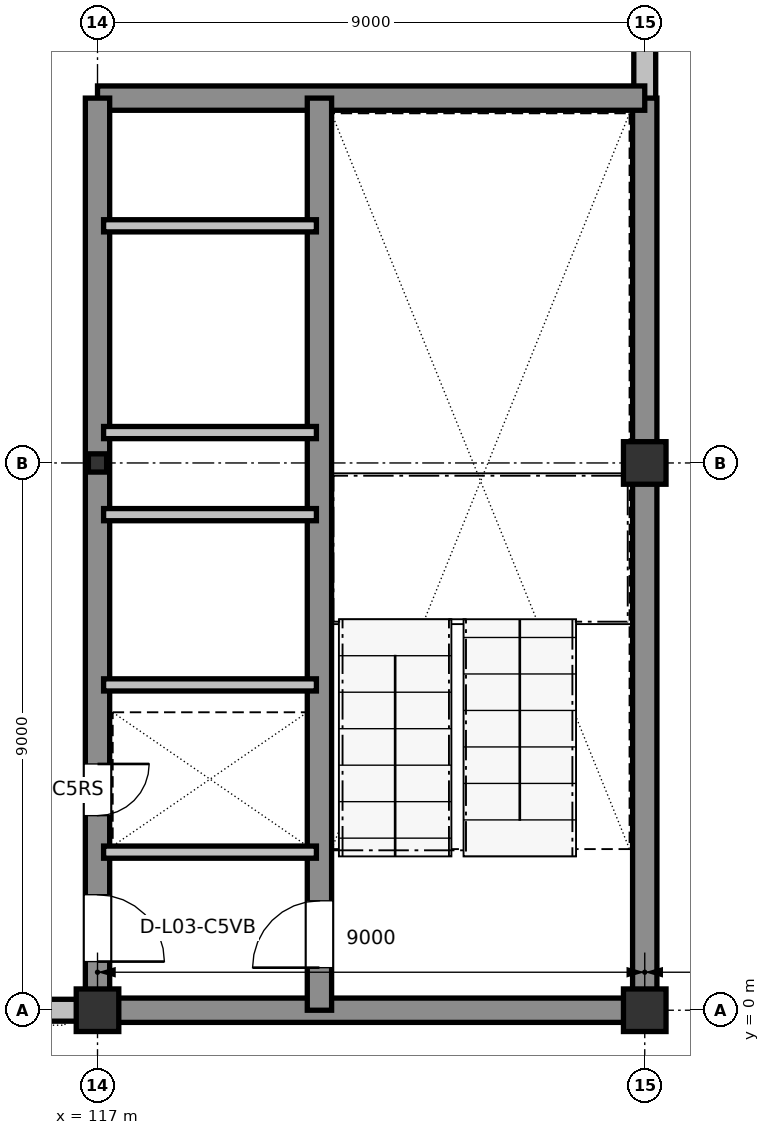
"""IFC4 building model, lengths in metres.
Left out: names, types, materials, properties, quantities, classifications, styles, units other than length and angle.
Written with IfcOpenShell. Run it as: python <this file> out.ifc"""

import sys

from ifc_helpers import new_model, si_unit, direction, frame, frame_2d, origin, origin_2d, place, context, subcontext, project, spatial, rectangle, i_section, extrude, element, fill, save


model = new_model("IFC4")
c1 = context("Model", 3, precision=1e-05, world=origin(), true_north=direction((0.0, 1.0)))
c2 = subcontext(c1, "Body", "Model", "MODEL_VIEW")
j1 = project(units=[si_unit("LENGTHUNIT", "METRE"), si_unit("PLANEANGLEUNIT", "RADIAN")], contexts=[c1])
p1 = place(None, origin())
s1 = spatial("IfcSite", under=j1, at=p1, CompositionType="ELEMENT")
p2 = place(p1, origin())
s2 = spatial("IfcBuilding", under=s1, at=p2, CompositionType="ELEMENT")
p3 = place(p2, frame((0.0, 0.0, 15.0)))
s3 = spatial("IfcBuildingStorey", under=s2, at=p3, CompositionType="ELEMENT", Elevation=15.0)
p4 = place(p3, frame((117.0, 0.0, 0.0), z_axis=(0.0, 0.0, 1.0), x_axis=(1.0, 0.0, 0.0)))
e1 = element("IfcColumn", 1, at=p4, inside=s3, PredefinedType="COLUMN", context=c2, shape_type="SweptSolid", body=[
    extrude(rectangle(XDim=0.7, YDim=0.7, at=origin_2d()), origin(), (0.0, 0.0, 1.0), 4.2),
])
p5 = place(p3, frame((117.0, 9.0, 0.0), z_axis=(0.0, 0.0, 1.0), x_axis=(1.0, 0.0, 0.0)))
e2 = element("IfcColumn", 2, at=p5, inside=s3, PredefinedType="COLUMN", context=c2, shape_type="SweptSolid", body=[
    extrude(i_section(OverallWidth=0.3, OverallDepth=0.3, WebThickness=0.011, FlangeThickness=0.019, at=origin_2d()), origin(), (0.0, 0.0, 1.0), 4.2),
])
for number, where, z_axis, x_axis in (
    (3, (126.0, 0.0, 0.0), (0.0, 0.0, 1.0), (1.0, 0.0, 0.0)),
    (4, (126.0, 9.0, 0.0), (0.0, 0.0, 1.0), (1.0, 0.0, 0.0)),
):
    element("IfcColumn", number, at=place(p3, frame(where, z_axis=z_axis, x_axis=x_axis)), inside=s3, PredefinedType="COLUMN", context=c2, shape_type="SweptSolid", body=[
        extrude(rectangle(XDim=0.7, YDim=0.7, at=origin_2d()), origin(), (0.0, 0.0, 1.0), 4.2),
    ])
p6 = place(p3, frame((108.335, 0.0, 0.0), z_axis=(0.0, 0.0, 1.0), x_axis=(1.0, 0.0, 0.0)))
e5 = element("IfcWall", 5, at=p6, inside=s3, PredefinedType="STANDARD", context=c2, shape_type="SweptSolid", body=[
    extrude(rectangle(XDim=8.33, YDim=0.36, at=frame_2d((4.165, 0.0))), origin(), (0.0, 0.0, 1.0), 3.635),
])
p7 = place(p6, frame((3.565, 0.0, 0.9)))
e6 = element("IfcOpeningElement", 6, at=p7, cuts=e5, PredefinedType="OPENING", context=c2, shape_type="SweptSolid", body=[
    extrude(rectangle(XDim=1.2, YDim=1.4, at=frame_2d((0.6, 0.7))), frame((0.0, 0.19, 0.0), z_axis=(0.0, -1.0, 0.0), x_axis=(1.0, 0.0, 0.0)), (0.0, 0.0, 1.0), 0.38),
])
p8 = place(p3, frame((126.0, 14.925, 0.0), z_axis=(0.0, 0.0, 1.0), x_axis=(0.0, 1.0, 0.0)))
e7 = element("IfcWall", 7, at=p8, inside=s3, PredefinedType="STANDARD", context=c2, shape_type="SweptSolid", body=[
    extrude(rectangle(XDim=2.74, YDim=0.36, at=frame_2d((1.37, 0.0))), origin(), (0.0, 0.0, 1.0), 3.635),
])
p9 = place(p3, frame((117.0, 0.0, 0.0), z_axis=(0.0, 0.0, 1.0), x_axis=(1.0, 0.0, 0.0)))
e8 = element("IfcWall", 8, at=p9, inside=s3, PredefinedType="SHEAR", context=c2, shape_type="SweptSolid", body=[
    extrude(rectangle(XDim=9.0, YDim=0.4, at=frame_2d((4.5, 0.0))), origin(), (0.0, 0.0, 1.0), 3.96),
])
p10 = place(p3, frame((126.0, 0.0, 0.0), z_axis=(0.0, 0.0, 1.0), x_axis=(0.0, 1.0, 0.0)))
e9 = element("IfcWall", 9, at=p10, inside=s3, PredefinedType="SHEAR", context=c2, shape_type="SweptSolid", body=[
    extrude(rectangle(XDim=15.0, YDim=0.4, at=frame_2d((7.5, 0.0))), origin(), (0.0, 0.0, 1.0), 3.96),
])
p11 = place(p3, frame((126.0, 15.0, 0.0), z_axis=(0.0, 0.0, 1.0), x_axis=(-1.0, 0.0, 0.0)))
e10 = element("IfcWall", 10, at=p11, inside=s3, PredefinedType="SHEAR", context=c2, shape_type="SweptSolid", body=[
    extrude(rectangle(XDim=9.0, YDim=0.4, at=frame_2d((4.5, 0.0))), origin(), (0.0, 0.0, 1.0), 3.96),
])
p12 = place(p3, frame((117.0, 15.0, 0.0), z_axis=(0.0, 0.0, 1.0), x_axis=(0.0, -1.0, 0.0)))
e11 = element("IfcWall", 11, at=p12, inside=s3, PredefinedType="SHEAR", context=c2, shape_type="SweptSolid", body=[
    extrude(rectangle(XDim=15.0, YDim=0.4, at=frame_2d((7.5, 0.0))), origin(), (0.0, 0.0, 1.0), 3.96),
])
p13 = place(p12, frame((13.1, 0.0, 0.0)))
e12 = element("IfcOpeningElement", 12, at=p13, cuts=e11, PredefinedType="OPENING", context=c2, shape_type="SweptSolid", body=[
    extrude(rectangle(XDim=1.1, YDim=2.16, at=frame_2d((0.55, 1.08))), frame((0.0, 0.21, 0.0), z_axis=(0.0, -1.0, 0.0), x_axis=(1.0, 0.0, 0.0)), (0.0, 0.0, 1.0), 0.42),
])
p14 = place(p12, frame((10.95, 0.0, 0.0)))
e13 = element("IfcOpeningElement", 13, at=p14, cuts=e11, PredefinedType="OPENING", context=c2, shape_type="SweptSolid", body=[
    extrude(rectangle(XDim=0.85, YDim=2.1, at=frame_2d((0.425, 1.05))), frame((0.0, 0.21, 0.0), z_axis=(0.0, -1.0, 0.0), x_axis=(1.0, 0.0, 0.0)), (0.0, 0.0, 1.0), 0.42),
])
p15 = place(p3, frame((120.65, 0.0, 0.0), z_axis=(0.0, 0.0, 1.0), x_axis=(0.0, 1.0, 0.0)))
e14 = element("IfcWall", 14, at=p15, inside=s3, PredefinedType="SHEAR", context=c2, shape_type="SweptSolid", body=[
    extrude(rectangle(XDim=15.0, YDim=0.4, at=frame_2d((7.5, 0.0))), origin(), (0.0, 0.0, 1.0), 3.96),
])
p16 = place(p15, frame((0.7, 0.0, 0.0)))
e15 = element("IfcOpeningElement", 15, at=p16, cuts=e14, PredefinedType="OPENING", context=c2, shape_type="SweptSolid", body=[
    extrude(rectangle(XDim=1.1, YDim=2.16, at=frame_2d((0.55, 1.08))), frame((0.0, 0.21, 0.0), z_axis=(0.0, -1.0, 0.0), x_axis=(1.0, 0.0, 0.0)), (0.0, 0.0, 1.0), 0.42),
])
for number, where, z_axis, x_axis in (
    (16, (117.1, 2.6, 0.0), (0.0, 0.0, 1.0), (1.0, 0.0, 0.0)),
    (17, (117.1, 5.35, 0.0), (0.0, 0.0, 1.0), (1.0, 0.0, 0.0)),
    (18, (117.1, 8.15, 0.0), (0.0, 0.0, 1.0), (1.0, 0.0, 0.0)),
    (19, (117.1, 9.5, 0.0), (0.0, 0.0, 1.0), (1.0, 0.0, 0.0)),
    (20, (117.1, 12.9, 0.0), (0.0, 0.0, 1.0), (1.0, 0.0, 0.0)),
):
    element("IfcWall", number, at=place(p3, frame(where, z_axis=z_axis, x_axis=x_axis)), inside=s3, PredefinedType="PARTITIONING", context=c2, shape_type="SweptSolid", body=[
        extrude(rectangle(XDim=3.5, YDim=0.2, at=frame_2d((1.75, 0.0))), origin(), (0.0, 0.0, 1.0), 3.96),
    ])
p17 = place(p16, origin())
e21 = element("IfcDoor", 21, at=p17, inside=s3, OperationType="SINGLE_SWING_LEFT", PredefinedType="DOOR", context=c2, shape_type="SweptSolid", body=[
    extrude(rectangle(XDim=1.1, YDim=2.16, at=frame_2d((0.55, 1.08))), frame((0.0, 0.025, 0.0), z_axis=(0.0, -1.0, 0.0), x_axis=(1.0, 0.0, 0.0)), (0.0, 0.0, 1.0), 0.05),
])
fill(e15, e21)
p18 = place(p13, origin())
e22 = element("IfcDoor", 22, at=p18, inside=s3, OperationType="SINGLE_SWING_RIGHT", PredefinedType="DOOR", context=c2, shape_type="SweptSolid", body=[
    extrude(rectangle(XDim=1.1, YDim=2.16, at=frame_2d((0.55, 1.08))), frame((0.0, 0.025, 0.0), z_axis=(0.0, -1.0, 0.0), x_axis=(1.0, 0.0, 0.0)), (0.0, 0.0, 1.0), 0.05),
])
fill(e12, e22)
p19 = place(p14, origin())
e23 = element("IfcDoor", 23, at=p19, inside=s3, OperationType="SINGLE_SWING_LEFT", PredefinedType="DOOR", context=c2, shape_type="SweptSolid", body=[
    extrude(rectangle(XDim=0.85, YDim=2.1, at=frame_2d((0.425, 1.05))), frame((0.0, 0.025, 0.0), z_axis=(0.0, -1.0, 0.0), x_axis=(1.0, 0.0, 0.0)), (0.0, 0.0, 1.0), 0.05),
])
fill(e13, e23)
save(model, sys.argv[1])
